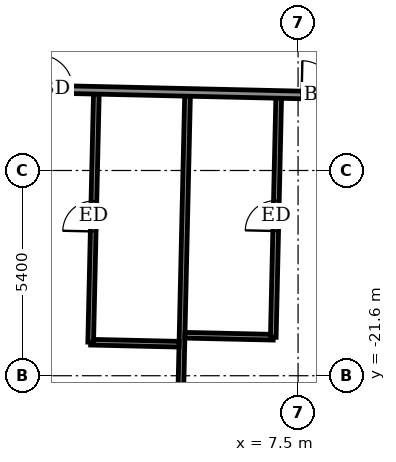
"""IFC4 building model, lengths in metres.
Left out: names, types, materials, properties, quantities, classifications, styles, units other than length and angle.
Written with IfcOpenShell. Run it as: python <this file> out.ifc"""

import sys

from ifc_helpers import new_model, si_unit, direction, frame, frame_2d, origin, place, context, subcontext, project, spatial, rectangle, extrude, element, fill, save


model = new_model("IFC4")
c1 = context("Model", 3, precision=1e-05, world=origin(), true_north=direction((0.0, 1.0)))
c2 = subcontext(c1, "Body", "Model", "MODEL_VIEW")
j1 = project(units=[si_unit("LENGTHUNIT", "METRE"), si_unit("PLANEANGLEUNIT", "RADIAN")], contexts=[c1])
p1 = place(None, origin())
s1 = spatial("IfcSite", under=j1, at=p1, CompositionType="ELEMENT")
p2 = place(p1, origin())
s2 = spatial("IfcBuilding", under=s1, at=p2, CompositionType="ELEMENT")
p3 = place(p2, frame((0.0, 0.0, 316.9)))
s3 = spatial("IfcBuildingStorey", under=s2, at=p3, CompositionType="ELEMENT", Elevation=316.9)
p4 = place(p3, frame((4.331, -25.692, 0.0), z_axis=(0.0, 0.0, 1.0), x_axis=(0.022708812003, 0.999742121678, 0.0)))
e1 = element("IfcWall", 1, at=p4, inside=s3, PredefinedType="PARTITIONING", context=c2, shape_type="SweptSolid", body=[
    extrude(rectangle(XDim=11.45, YDim=0.15, at=frame_2d((5.725, 0.0))), origin(), (0.0, 0.0, 1.0), 2.5),
])
p5 = place(p3, frame((2.043, -20.718, 0.0), z_axis=(0.0, 0.0, 1.0), x_axis=(0.999740478815, -0.022781023197, 0.0)))
e2 = element("IfcWall", 2, at=p5, inside=s3, PredefinedType="PARTITIONING", context=c2, shape_type="SweptSolid", body=[
    extrude(rectangle(XDim=2.325, YDim=0.15, at=frame_2d((1.163, 0.0))), origin(), (0.0, 0.0, 1.0), 3.05),
])
p6 = place(p3, frame((2.043, -20.718, 0.0), z_axis=(0.0, 0.0, 1.0), x_axis=(0.022807185318, 0.999739882318, 0.0)))
e3 = element("IfcWall", 3, at=p6, inside=s3, PredefinedType="PARTITIONING", context=c2, shape_type="SweptSolid", body=[
    extrude(rectangle(XDim=6.53, YDim=0.15, at=frame_2d((3.265, 0.0))), origin(), (0.0, 0.0, 1.0), 3.05),
])
p7 = place(p6, frame((2.915, 0.0, 0.0)))
e4 = element("IfcOpeningElement", 4, at=p7, cuts=e3, PredefinedType="OPENING", context=c2, shape_type="SweptSolid", body=[
    extrude(rectangle(XDim=0.8, YDim=2.1, at=frame_2d((0.4, 1.05))), frame((0.0, 0.085, 0.0), z_axis=(0.0, -1.0, 0.0), x_axis=(1.0, 0.0, 0.0)), (0.0, 0.0, 1.0), 0.17),
])
p8 = place(p3, frame((4.523, -20.535, 0.0), z_axis=(0.0, 0.0, 1.0), x_axis=(0.999749954681, -0.022361308448, 0.0)))
e5 = element("IfcWall", 5, at=p8, inside=s3, PredefinedType="PARTITIONING", context=c2, shape_type="SweptSolid", body=[
    extrude(rectangle(XDim=2.325, YDim=0.15, at=frame_2d((1.163, 0.0))), origin(), (0.0, 0.0, 1.0), 3.05),
])
p9 = place(p3, frame((6.848, -20.587, 0.0), z_axis=(0.0, 0.0, 1.0), x_axis=(0.022591786368, 0.999744773024, 0.0)))
e6 = element("IfcWall", 6, at=p9, inside=s3, PredefinedType="PARTITIONING", context=c2, shape_type="SweptSolid", body=[
    extrude(rectangle(XDim=6.29, YDim=0.15, at=frame_2d((3.145, 0.0))), origin(), (0.0, 0.0, 1.0), 3.05),
])
p10 = place(p9, frame((2.795, 0.0, 0.0)))
e7 = element("IfcOpeningElement", 7, at=p10, cuts=e6, PredefinedType="OPENING", context=c2, shape_type="SweptSolid", body=[
    extrude(rectangle(XDim=0.8, YDim=2.1, at=frame_2d((0.4, 1.05))), frame((0.0, 0.085, 0.0), z_axis=(0.0, -1.0, 0.0), x_axis=(1.0, 0.0, 0.0)), (0.0, 0.0, 1.0), 0.17),
])
p11 = place(p3, frame((-31.347, -13.329, 0.0), z_axis=(0.0, 0.0, 1.0), x_axis=(0.999742613079, -0.022687168058, 0.0)))
e8 = element("IfcWall", 8, at=p11, inside=s3, PredefinedType="PARTITIONING", context=c2, shape_type="SweptSolid", body=[
    extrude(rectangle(XDim=58.799, YDim=0.2, at=frame_2d((29.399, 0.0))), origin(), (0.0, 0.0, 1.0), 3.05),
])
p12 = place(p11, frame((2.075, 0.0, 0.0)))
e9 = element("IfcOpeningElement", 9, at=p12, cuts=e8, PredefinedType="OPENING", context=c2, shape_type="SweptSolid", body=[
    extrude(rectangle(XDim=1.0, YDim=2.1, at=frame_2d((0.5, 1.05))), frame((0.0, 0.11, 0.0), z_axis=(0.0, -1.0, 0.0), x_axis=(1.0, 0.0, 0.0)), (0.0, 0.0, 1.0), 0.22),
])
p13 = place(p11, frame((7.5, 0.0, 0.0)))
e10 = element("IfcOpeningElement", 10, at=p13, cuts=e8, PredefinedType="OPENING", context=c2, shape_type="SweptSolid", body=[
    extrude(rectangle(XDim=0.9, YDim=2.1, at=frame_2d((0.45, 1.05))), frame((0.0, 0.11, 0.0), z_axis=(0.0, -1.0, 0.0), x_axis=(1.0, 0.0, 0.0)), (0.0, 0.0, 1.0), 0.22),
])
p14 = place(p11, frame((12.35, 0.0, 0.0)))
e11 = element("IfcOpeningElement", 11, at=p14, cuts=e8, PredefinedType="OPENING", context=c2, shape_type="SweptSolid", body=[
    extrude(rectangle(XDim=0.9, YDim=2.1, at=frame_2d((0.45, 1.05))), frame((0.0, 0.11, 0.0), z_axis=(0.0, -1.0, 0.0), x_axis=(1.0, 0.0, 0.0)), (0.0, 0.0, 1.0), 0.22),
])
p15 = place(p11, frame((14.425, 0.0, 0.0)))
e12 = element("IfcOpeningElement", 12, at=p15, cuts=e8, PredefinedType="OPENING", context=c2, shape_type="SweptSolid", body=[
    extrude(rectangle(XDim=0.9, YDim=2.1, at=frame_2d((0.45, 1.05))), frame((0.0, 0.11, 0.0), z_axis=(0.0, -1.0, 0.0), x_axis=(1.0, 0.0, 0.0)), (0.0, 0.0, 1.0), 0.22),
])
p16 = place(p11, frame((21.225, 0.0, 0.0)))
e13 = element("IfcOpeningElement", 13, at=p16, cuts=e8, PredefinedType="OPENING", context=c2, shape_type="SweptSolid", body=[
    extrude(rectangle(XDim=0.9, YDim=2.1, at=frame_2d((0.45, 1.05))), frame((0.0, 0.11, 0.0), z_axis=(0.0, -1.0, 0.0), x_axis=(1.0, 0.0, 0.0)), (0.0, 0.0, 1.0), 0.22),
])
p17 = place(p11, frame((23.25, 0.0, 0.0)))
e14 = element("IfcOpeningElement", 14, at=p17, cuts=e8, PredefinedType="OPENING", context=c2, shape_type="SweptSolid", body=[
    extrude(rectangle(XDim=0.9, YDim=2.1, at=frame_2d((0.45, 1.05))), frame((0.0, 0.11, 0.0), z_axis=(0.0, -1.0, 0.0), x_axis=(1.0, 0.0, 0.0)), (0.0, 0.0, 1.0), 0.22),
])
p18 = place(p11, frame((30.025, 0.0, 0.0)))
e15 = element("IfcOpeningElement", 15, at=p18, cuts=e8, PredefinedType="OPENING", context=c2, shape_type="SweptSolid", body=[
    extrude(rectangle(XDim=0.9, YDim=2.1, at=frame_2d((0.45, 1.05))), frame((0.0, 0.11, 0.0), z_axis=(0.0, -1.0, 0.0), x_axis=(1.0, 0.0, 0.0)), (0.0, 0.0, 1.0), 0.22),
])
p19 = place(p11, frame((32.025, 0.0, 0.0)))
e16 = element("IfcOpeningElement", 16, at=p19, cuts=e8, PredefinedType="OPENING", context=c2, shape_type="SweptSolid", body=[
    extrude(rectangle(XDim=0.9, YDim=2.1, at=frame_2d((0.45, 1.05))), frame((0.0, 0.11, 0.0), z_axis=(0.0, -1.0, 0.0), x_axis=(1.0, 0.0, 0.0)), (0.0, 0.0, 1.0), 0.22),
])
p20 = place(p11, frame((38.95, 0.0, 0.0)))
e17 = element("IfcOpeningElement", 17, at=p20, cuts=e8, PredefinedType="OPENING", context=c2, shape_type="SweptSolid", body=[
    extrude(rectangle(XDim=0.9, YDim=2.1, at=frame_2d((0.45, 1.05))), frame((0.0, 0.11, 0.0), z_axis=(0.0, -1.0, 0.0), x_axis=(1.0, 0.0, 0.0)), (0.0, 0.0, 1.0), 0.22),
])
p21 = place(p11, frame((41.05, 0.0, 0.0)))
e18 = element("IfcOpeningElement", 18, at=p21, cuts=e8, PredefinedType="OPENING", context=c2, shape_type="SweptSolid", body=[
    extrude(rectangle(XDim=0.9, YDim=2.1, at=frame_2d((0.45, 1.05))), frame((0.0, 0.11, 0.0), z_axis=(0.0, -1.0, 0.0), x_axis=(1.0, 0.0, 0.0)), (0.0, 0.0, 1.0), 0.22),
])
p22 = place(p11, frame((47.925, 0.0, 0.0)))
e19 = element("IfcOpeningElement", 19, at=p22, cuts=e8, PredefinedType="OPENING", context=c2, shape_type="SweptSolid", body=[
    extrude(rectangle(XDim=0.9, YDim=2.1, at=frame_2d((0.45, 1.05))), frame((0.0, 0.11, 0.0), z_axis=(0.0, -1.0, 0.0), x_axis=(1.0, 0.0, 0.0)), (0.0, 0.0, 1.0), 0.22),
])
p23 = place(p11, frame((53.618, 0.0, 0.0)))
e20 = element("IfcOpeningElement", 20, at=p23, cuts=e8, PredefinedType="OPENING", context=c2, shape_type="SweptSolid", body=[
    extrude(rectangle(XDim=1.0, YDim=2.1, at=frame_2d((0.5, 1.05))), frame((0.0, 0.11, 0.0), z_axis=(0.0, -1.0, 0.0), x_axis=(1.0, 0.0, 0.0)), (0.0, 0.0, 1.0), 0.22),
])
p24 = place(p19, origin())
e21 = element("IfcDoor", 21, at=p24, inside=s3, OperationType="SINGLE_SWING_RIGHT", PredefinedType="DOOR", context=c2, shape_type="SweptSolid", body=[
    extrude(rectangle(XDim=0.9, YDim=2.1, at=frame_2d((0.45, 1.05))), frame((0.0, 0.025, 0.0), z_axis=(0.0, -1.0, 0.0), x_axis=(1.0, 0.0, 0.0)), (0.0, 0.0, 1.0), 0.05),
])
fill(e16, e21)
p25 = place(p7, origin())
e22 = element("IfcDoor", 22, at=p25, inside=s3, OperationType="SINGLE_SWING_RIGHT", PredefinedType="DOOR", context=c2, shape_type="SweptSolid", body=[
    extrude(rectangle(XDim=0.8, YDim=2.1, at=frame_2d((0.4, 1.05))), frame((0.0, 0.025, 0.0), z_axis=(0.0, -1.0, 0.0), x_axis=(1.0, 0.0, 0.0)), (0.0, 0.0, 1.0), 0.05),
])
fill(e4, e22)
p26 = place(p20, origin())
e23 = element("IfcDoor", 23, at=p26, inside=s3, OperationType="SINGLE_SWING_LEFT", PredefinedType="DOOR", context=c2, shape_type="SweptSolid", body=[
    extrude(rectangle(XDim=0.9, YDim=2.1, at=frame_2d((0.45, 1.05))), frame((0.0, 0.025, 0.0), z_axis=(0.0, -1.0, 0.0), x_axis=(1.0, 0.0, 0.0)), (0.0, 0.0, 1.0), 0.05),
])
fill(e17, e23)
p27 = place(p10, origin())
e24 = element("IfcDoor", 24, at=p27, inside=s3, OperationType="SINGLE_SWING_LEFT", PredefinedType="DOOR", context=c2, shape_type="SweptSolid", body=[
    extrude(rectangle(XDim=0.8, YDim=2.1, at=frame_2d((0.4, 1.05))), frame((0.0, 0.025, 0.0), z_axis=(0.0, -1.0, 0.0), x_axis=(1.0, 0.0, 0.0)), (0.0, 0.0, 1.0), 0.05),
])
fill(e7, e24)
save(model, sys.argv[1])
